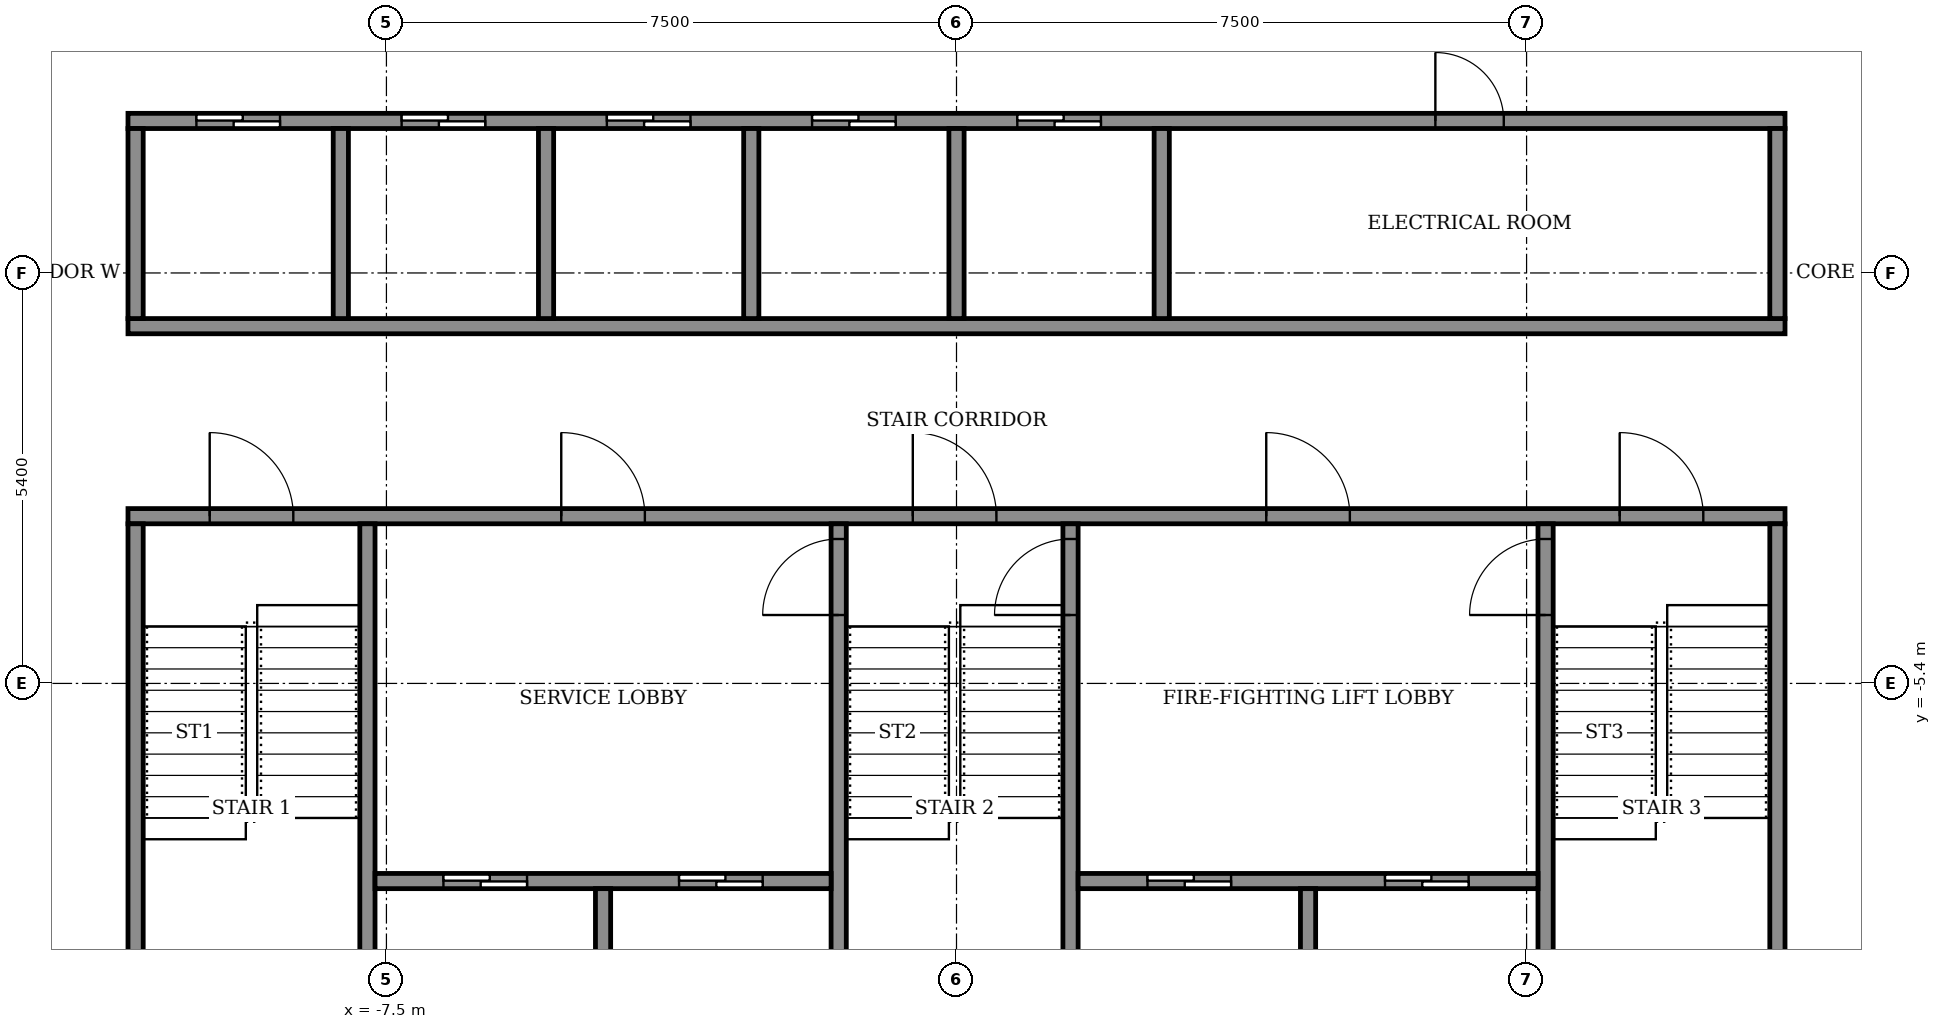
"""IFC4 building model, lengths in metres.
Left out: names, types, materials, properties, quantities, classifications, styles, units other than length and angle.
Written with IfcOpenShell. Run it as: python <this file> out.ifc"""

import sys

from ifc_helpers import new_model, si_unit, direction, frame, frame_2d, origin, place, context, subcontext, project, spatial, rectangle, extrude, element, fill, save


model = new_model("IFC4")
c1 = context("Model", 3, precision=1e-05, world=origin(), true_north=direction((0.0, 1.0)))
c2 = subcontext(c1, "Body", "Model", "MODEL_VIEW")
j1 = project(units=[si_unit("LENGTHUNIT", "METRE"), si_unit("PLANEANGLEUNIT", "RADIAN")], contexts=[c1])
p1 = place(None, origin())
s1 = spatial("IfcSite", under=j1, at=p1, CompositionType="ELEMENT")
p2 = place(p1, origin())
s2 = spatial("IfcBuilding", under=s1, at=p2, CompositionType="ELEMENT")
p3 = place(p2, frame((0.0, 0.0, 109.1)))
s3 = spatial("IfcBuildingStorey", under=s2, at=p3, CompositionType="ELEMENT", Elevation=109.1)
p4 = place(p3, frame((-10.9, -3.2, 0.0), z_axis=(0.0, 0.0, 1.0), x_axis=(1.0, 0.0, 0.0)))
e1 = element("IfcWall", 1, at=p4, inside=s3, PredefinedType="SHEAR", context=c2, shape_type="SweptSolid", body=[
    extrude(rectangle(XDim=21.8, YDim=0.2, at=frame_2d((10.9, 0.0))), origin(), (0.0, 0.0, 1.0), 3.05),
])
p5 = place(p4, frame((1.075, 0.0, 0.0)))
e2 = element("IfcOpeningElement", 2, at=p5, cuts=e1, PredefinedType="OPENING", context=c2, shape_type="SweptSolid", body=[
    extrude(rectangle(XDim=1.1, YDim=2.1, at=frame_2d((0.55, 1.05))), frame((0.0, 0.11, 0.0), z_axis=(0.0, -1.0, 0.0), x_axis=(1.0, 0.0, 0.0)), (0.0, 0.0, 1.0), 0.22),
])
p6 = place(p4, frame((10.325, 0.0, 0.0)))
e3 = element("IfcOpeningElement", 3, at=p6, cuts=e1, PredefinedType="OPENING", context=c2, shape_type="SweptSolid", body=[
    extrude(rectangle(XDim=1.1, YDim=2.1, at=frame_2d((0.55, 1.05))), frame((0.0, 0.11, 0.0), z_axis=(0.0, -1.0, 0.0), x_axis=(1.0, 0.0, 0.0)), (0.0, 0.0, 1.0), 0.22),
])
p7 = place(p4, frame((19.625, 0.0, 0.0)))
e4 = element("IfcOpeningElement", 4, at=p7, cuts=e1, PredefinedType="OPENING", context=c2, shape_type="SweptSolid", body=[
    extrude(rectangle(XDim=1.1, YDim=2.1, at=frame_2d((0.55, 1.05))), frame((0.0, 0.11, 0.0), z_axis=(0.0, -1.0, 0.0), x_axis=(1.0, 0.0, 0.0)), (0.0, 0.0, 1.0), 0.22),
])
p8 = place(p4, frame((5.7, 0.0, 0.0)))
e5 = element("IfcOpeningElement", 5, at=p8, cuts=e1, PredefinedType="OPENING", context=c2, shape_type="SweptSolid", body=[
    extrude(rectangle(XDim=1.1, YDim=2.1, at=frame_2d((0.55, 1.05))), frame((0.0, 0.11, 0.0), z_axis=(0.0, -1.0, 0.0), x_axis=(1.0, 0.0, 0.0)), (0.0, 0.0, 1.0), 0.22),
])
p9 = place(p4, frame((14.975, 0.0, 0.0)))
e6 = element("IfcOpeningElement", 6, at=p9, cuts=e1, PredefinedType="OPENING", context=c2, shape_type="SweptSolid", body=[
    extrude(rectangle(XDim=1.1, YDim=2.1, at=frame_2d((0.55, 1.05))), frame((0.0, 0.11, 0.0), z_axis=(0.0, -1.0, 0.0), x_axis=(1.0, 0.0, 0.0)), (0.0, 0.0, 1.0), 0.22),
])
p10 = place(p3, frame((-10.9, -0.7, 0.0), z_axis=(0.0, 0.0, 1.0), x_axis=(1.0, 0.0, 0.0)))
e7 = element("IfcWall", 7, at=p10, inside=s3, PredefinedType="SHEAR", context=c2, shape_type="SweptSolid", body=[
    extrude(rectangle(XDim=21.8, YDim=0.2, at=frame_2d((10.9, 0.0))), origin(), (0.0, 0.0, 1.0), 3.05),
])
p11 = place(p3, frame((-10.9, 2.0, 0.0), z_axis=(0.0, 0.0, 1.0), x_axis=(1.0, 0.0, 0.0)))
e8 = element("IfcWall", 8, at=p11, inside=s3, PredefinedType="SHEAR", context=c2, shape_type="SweptSolid", body=[
    extrude(rectangle(XDim=21.8, YDim=0.2, at=frame_2d((10.9, 0.0))), origin(), (0.0, 0.0, 1.0), 3.05),
])
p12 = place(p11, frame((0.9, 0.0, 0.0)))
e9 = element("IfcOpeningElement", 9, at=p12, cuts=e8, PredefinedType="OPENING", context=c2, shape_type="SweptSolid", body=[
    extrude(rectangle(XDim=1.1, YDim=2.1, at=frame_2d((0.55, 1.05))), frame((0.0, 0.11, 0.0), z_axis=(0.0, -1.0, 0.0), x_axis=(1.0, 0.0, 0.0)), (0.0, 0.0, 1.0), 0.22),
])
p13 = place(p11, frame((3.6, 0.0, 0.0)))
e10 = element("IfcOpeningElement", 10, at=p13, cuts=e8, PredefinedType="OPENING", context=c2, shape_type="SweptSolid", body=[
    extrude(rectangle(XDim=1.1, YDim=2.1, at=frame_2d((0.55, 1.05))), frame((0.0, 0.11, 0.0), z_axis=(0.0, -1.0, 0.0), x_axis=(1.0, 0.0, 0.0)), (0.0, 0.0, 1.0), 0.22),
])
p14 = place(p11, frame((6.3, 0.0, 0.0)))
e11 = element("IfcOpeningElement", 11, at=p14, cuts=e8, PredefinedType="OPENING", context=c2, shape_type="SweptSolid", body=[
    extrude(rectangle(XDim=1.1, YDim=2.1, at=frame_2d((0.55, 1.05))), frame((0.0, 0.11, 0.0), z_axis=(0.0, -1.0, 0.0), x_axis=(1.0, 0.0, 0.0)), (0.0, 0.0, 1.0), 0.22),
])
p15 = place(p11, frame((9.0, 0.0, 0.0)))
e12 = element("IfcOpeningElement", 12, at=p15, cuts=e8, PredefinedType="OPENING", context=c2, shape_type="SweptSolid", body=[
    extrude(rectangle(XDim=1.1, YDim=2.1, at=frame_2d((0.55, 1.05))), frame((0.0, 0.11, 0.0), z_axis=(0.0, -1.0, 0.0), x_axis=(1.0, 0.0, 0.0)), (0.0, 0.0, 1.0), 0.22),
])
p16 = place(p11, frame((11.7, 0.0, 0.0)))
e13 = element("IfcOpeningElement", 13, at=p16, cuts=e8, PredefinedType="OPENING", context=c2, shape_type="SweptSolid", body=[
    extrude(rectangle(XDim=1.1, YDim=2.1, at=frame_2d((0.55, 1.05))), frame((0.0, 0.11, 0.0), z_axis=(0.0, -1.0, 0.0), x_axis=(1.0, 0.0, 0.0)), (0.0, 0.0, 1.0), 0.22),
])
p17 = place(p11, frame((17.2, 0.0, 0.0)))
e14 = element("IfcOpeningElement", 14, at=p17, cuts=e8, PredefinedType="OPENING", context=c2, shape_type="SweptSolid", body=[
    extrude(rectangle(XDim=0.9, YDim=2.1, at=frame_2d((0.45, 1.05))), frame((0.0, 0.11, 0.0), z_axis=(0.0, -1.0, 0.0), x_axis=(1.0, 0.0, 0.0)), (0.0, 0.0, 1.0), 0.22),
])
for number, where, z_axis, x_axis in (
    (15, (-10.8, -10.8, 0.0), (0.0, 0.0, 1.0), (0.0, 1.0, 0.0)),
    (16, (-7.75, -10.8, 0.0), (0.0, 0.0, 1.0), (0.0, 1.0, 0.0)),
):
    element("IfcWall", number, at=place(p3, frame(where, z_axis=z_axis, x_axis=x_axis)), inside=s3, PredefinedType="SHEAR", context=c2, shape_type="SweptSolid", body=[
        extrude(rectangle(XDim=7.5, YDim=0.2, at=frame_2d((3.75, 0.0))), origin(), (0.0, 0.0, 1.0), 3.05),
    ])
p18 = place(p3, frame((-1.55, -10.8, 0.0), z_axis=(0.0, 0.0, 1.0), x_axis=(0.0, 1.0, 0.0)))
e17 = element("IfcWall", 17, at=p18, inside=s3, PredefinedType="SHEAR", context=c2, shape_type="SweptSolid", body=[
    extrude(rectangle(XDim=7.5, YDim=0.2, at=frame_2d((3.75, 0.0))), origin(), (0.0, 0.0, 1.0), 3.05),
])
p19 = place(p18, frame((6.3, 0.0, 0.0)))
e18 = element("IfcOpeningElement", 18, at=p19, cuts=e17, PredefinedType="OPENING", context=c2, shape_type="SweptSolid", body=[
    extrude(rectangle(XDim=1.0, YDim=2.1, at=frame_2d((0.5, 1.05))), frame((0.0, 0.11, 0.0), z_axis=(0.0, -1.0, 0.0), x_axis=(1.0, 0.0, 0.0)), (0.0, 0.0, 1.0), 0.22),
])
p20 = place(p3, frame((1.5, -10.8, 0.0), z_axis=(0.0, 0.0, 1.0), x_axis=(0.0, 1.0, 0.0)))
e19 = element("IfcWall", 19, at=p20, inside=s3, PredefinedType="SHEAR", context=c2, shape_type="SweptSolid", body=[
    extrude(rectangle(XDim=7.5, YDim=0.2, at=frame_2d((3.75, 0.0))), origin(), (0.0, 0.0, 1.0), 3.05),
])
p21 = place(p20, frame((6.3, 0.0, 0.0)))
e20 = element("IfcOpeningElement", 20, at=p21, cuts=e19, PredefinedType="OPENING", context=c2, shape_type="SweptSolid", body=[
    extrude(rectangle(XDim=1.0, YDim=2.1, at=frame_2d((0.5, 1.05))), frame((0.0, 0.11, 0.0), z_axis=(0.0, -1.0, 0.0), x_axis=(1.0, 0.0, 0.0)), (0.0, 0.0, 1.0), 0.22),
])
p22 = place(p3, frame((7.75, -10.8, 0.0), z_axis=(0.0, 0.0, 1.0), x_axis=(0.0, 1.0, 0.0)))
e21 = element("IfcWall", 21, at=p22, inside=s3, PredefinedType="SHEAR", context=c2, shape_type="SweptSolid", body=[
    extrude(rectangle(XDim=7.5, YDim=0.2, at=frame_2d((3.75, 0.0))), origin(), (0.0, 0.0, 1.0), 3.05),
])
p23 = place(p22, frame((6.3, 0.0, 0.0)))
e22 = element("IfcOpeningElement", 22, at=p23, cuts=e21, PredefinedType="OPENING", context=c2, shape_type="SweptSolid", body=[
    extrude(rectangle(XDim=1.0, YDim=2.1, at=frame_2d((0.5, 1.05))), frame((0.0, 0.11, 0.0), z_axis=(0.0, -1.0, 0.0), x_axis=(1.0, 0.0, 0.0)), (0.0, 0.0, 1.0), 0.22),
])
p24 = place(p3, frame((10.8, -10.8, 0.0), z_axis=(0.0, 0.0, 1.0), x_axis=(0.0, 1.0, 0.0)))
e23 = element("IfcWall", 23, at=p24, inside=s3, PredefinedType="SHEAR", context=c2, shape_type="SweptSolid", body=[
    extrude(rectangle(XDim=7.5, YDim=0.2, at=frame_2d((3.75, 0.0))), origin(), (0.0, 0.0, 1.0), 3.05),
])
p25 = place(p3, frame((-7.65, -8.0, 0.0), z_axis=(0.0, 0.0, 1.0), x_axis=(1.0, 0.0, 0.0)))
e24 = element("IfcWall", 24, at=p25, inside=s3, PredefinedType="SHEAR", context=c2, shape_type="SweptSolid", body=[
    extrude(rectangle(XDim=6.0, YDim=0.2, at=frame_2d((3.0, 0.0))), origin(), (0.0, 0.0, 1.0), 3.05),
])
p26 = place(p25, frame((0.9, 0.0, 0.0)))
e25 = element("IfcOpeningElement", 25, at=p26, cuts=e24, PredefinedType="OPENING", context=c2, shape_type="SweptSolid", body=[
    extrude(rectangle(XDim=1.1, YDim=2.1, at=frame_2d((0.55, 1.05))), frame((0.0, 0.11, 0.0), z_axis=(0.0, -1.0, 0.0), x_axis=(1.0, 0.0, 0.0)), (0.0, 0.0, 1.0), 0.22),
])
p27 = place(p25, frame((4.0, 0.0, 0.0)))
e26 = element("IfcOpeningElement", 26, at=p27, cuts=e24, PredefinedType="OPENING", context=c2, shape_type="SweptSolid", body=[
    extrude(rectangle(XDim=1.1, YDim=2.1, at=frame_2d((0.55, 1.05))), frame((0.0, 0.11, 0.0), z_axis=(0.0, -1.0, 0.0), x_axis=(1.0, 0.0, 0.0)), (0.0, 0.0, 1.0), 0.22),
])
p28 = place(p3, frame((-4.65, -10.8, 0.0), z_axis=(0.0, 0.0, 1.0), x_axis=(0.0, 1.0, 0.0)))
e27 = element("IfcWall", 27, at=p28, inside=s3, PredefinedType="SHEAR", context=c2, shape_type="SweptSolid", body=[
    extrude(rectangle(XDim=2.7, YDim=0.2, at=frame_2d((1.35, 0.0))), origin(), (0.0, 0.0, 1.0), 3.05),
])
p29 = place(p3, frame((1.6, -8.0, 0.0), z_axis=(0.0, 0.0, 1.0), x_axis=(1.0, 0.0, 0.0)))
e28 = element("IfcWall", 28, at=p29, inside=s3, PredefinedType="SHEAR", context=c2, shape_type="SweptSolid", body=[
    extrude(rectangle(XDim=6.05, YDim=0.2, at=frame_2d((3.025, 0.0))), origin(), (0.0, 0.0, 1.0), 3.05),
])
p30 = place(p29, frame((0.913, 0.0, 0.0)))
e29 = element("IfcOpeningElement", 29, at=p30, cuts=e28, PredefinedType="OPENING", context=c2, shape_type="SweptSolid", body=[
    extrude(rectangle(XDim=1.1, YDim=2.1, at=frame_2d((0.55, 1.05))), frame((0.0, 0.11, 0.0), z_axis=(0.0, -1.0, 0.0), x_axis=(1.0, 0.0, 0.0)), (0.0, 0.0, 1.0), 0.22),
])
p31 = place(p29, frame((4.038, 0.0, 0.0)))
e30 = element("IfcOpeningElement", 30, at=p31, cuts=e28, PredefinedType="OPENING", context=c2, shape_type="SweptSolid", body=[
    extrude(rectangle(XDim=1.1, YDim=2.1, at=frame_2d((0.55, 1.05))), frame((0.0, 0.11, 0.0), z_axis=(0.0, -1.0, 0.0), x_axis=(1.0, 0.0, 0.0)), (0.0, 0.0, 1.0), 0.22),
])
p32 = place(p3, frame((4.625, -10.8, 0.0), z_axis=(0.0, 0.0, 1.0), x_axis=(0.0, 1.0, 0.0)))
e31 = element("IfcWall", 31, at=p32, inside=s3, PredefinedType="SHEAR", context=c2, shape_type="SweptSolid", body=[
    extrude(rectangle(XDim=2.7, YDim=0.2, at=frame_2d((1.35, 0.0))), origin(), (0.0, 0.0, 1.0), 3.05),
])
for number, where, z_axis, x_axis in (
    (32, (-10.8, -0.6, 0.0), (0.0, 0.0, 1.0), (0.0, 1.0, 0.0)),
    (33, (-8.1, -0.6, 0.0), (0.0, 0.0, 1.0), (0.0, 1.0, 0.0)),
    (34, (-5.4, -0.6, 0.0), (0.0, 0.0, 1.0), (0.0, 1.0, 0.0)),
    (35, (-2.7, -0.6, 0.0), (0.0, 0.0, 1.0), (0.0, 1.0, 0.0)),
    (36, (0.0, -0.6, 0.0), (0.0, 0.0, 1.0), (0.0, 1.0, 0.0)),
    (37, (2.7, -0.6, 0.0), (0.0, 0.0, 1.0), (0.0, 1.0, 0.0)),
):
    element("IfcWall", number, at=place(p3, frame(where, z_axis=z_axis, x_axis=x_axis)), inside=s3, PredefinedType="SHEAR", context=c2, shape_type="SweptSolid", body=[
        extrude(rectangle(XDim=2.5, YDim=0.2, at=frame_2d((1.25, 0.0))), origin(), (0.0, 0.0, 1.0), 3.05),
    ])
p33 = place(p3, frame((10.8, -0.6, 0.0), z_axis=(0.0, 0.0, 1.0), x_axis=(0.0, 1.0, 0.0)))
e38 = element("IfcWall", 38, at=p33, inside=s3, PredefinedType="STANDARD", context=c2, shape_type="SweptSolid", body=[
    extrude(rectangle(XDim=2.5, YDim=0.2, at=frame_2d((1.25, 0.0))), origin(), (0.0, 0.0, 1.0), 3.05),
])
p34 = place(p12, origin())
e39 = element("IfcDoor", 39, at=p34, inside=s3, OperationType="SLIDING_TO_LEFT", PredefinedType="DOOR", context=c2, shape_type="SweptSolid", body=[
    extrude(rectangle(XDim=1.1, YDim=2.1, at=frame_2d((0.55, 1.05))), frame((0.0, 0.025, 0.0), z_axis=(0.0, -1.0, 0.0), x_axis=(1.0, 0.0, 0.0)), (0.0, 0.0, 1.0), 0.05),
])
fill(e9, e39)
p35 = place(p13, origin())
e40 = element("IfcDoor", 40, at=p35, inside=s3, OperationType="SLIDING_TO_LEFT", PredefinedType="DOOR", context=c2, shape_type="SweptSolid", body=[
    extrude(rectangle(XDim=1.1, YDim=2.1, at=frame_2d((0.55, 1.05))), frame((0.0, 0.025, 0.0), z_axis=(0.0, -1.0, 0.0), x_axis=(1.0, 0.0, 0.0)), (0.0, 0.0, 1.0), 0.05),
])
fill(e10, e40)
p36 = place(p14, origin())
e41 = element("IfcDoor", 41, at=p36, inside=s3, OperationType="SLIDING_TO_LEFT", PredefinedType="DOOR", context=c2, shape_type="SweptSolid", body=[
    extrude(rectangle(XDim=1.1, YDim=2.1, at=frame_2d((0.55, 1.05))), frame((0.0, 0.025, 0.0), z_axis=(0.0, -1.0, 0.0), x_axis=(1.0, 0.0, 0.0)), (0.0, 0.0, 1.0), 0.05),
])
fill(e11, e41)
p37 = place(p15, origin())
e42 = element("IfcDoor", 42, at=p37, inside=s3, OperationType="SLIDING_TO_LEFT", PredefinedType="DOOR", context=c2, shape_type="SweptSolid", body=[
    extrude(rectangle(XDim=1.1, YDim=2.1, at=frame_2d((0.55, 1.05))), frame((0.0, 0.025, 0.0), z_axis=(0.0, -1.0, 0.0), x_axis=(1.0, 0.0, 0.0)), (0.0, 0.0, 1.0), 0.05),
])
fill(e12, e42)
p38 = place(p16, origin())
e43 = element("IfcDoor", 43, at=p38, inside=s3, OperationType="SLIDING_TO_LEFT", PredefinedType="DOOR", context=c2, shape_type="SweptSolid", body=[
    extrude(rectangle(XDim=1.1, YDim=2.1, at=frame_2d((0.55, 1.05))), frame((0.0, 0.025, 0.0), z_axis=(0.0, -1.0, 0.0), x_axis=(1.0, 0.0, 0.0)), (0.0, 0.0, 1.0), 0.05),
])
fill(e13, e43)
p39 = place(p17, origin())
e44 = element("IfcDoor", 44, at=p39, inside=s3, OperationType="SINGLE_SWING_LEFT", PredefinedType="DOOR", context=c2, shape_type="SweptSolid", body=[
    extrude(rectangle(XDim=0.9, YDim=2.1, at=frame_2d((0.45, 1.05))), frame((0.0, 0.025, 0.0), z_axis=(0.0, -1.0, 0.0), x_axis=(1.0, 0.0, 0.0)), (0.0, 0.0, 1.0), 0.05),
])
fill(e14, e44)
p40 = place(p30, origin())
e45 = element("IfcDoor", 45, at=p40, inside=s3, OperationType="SLIDING_TO_LEFT", PredefinedType="DOOR", context=c2, shape_type="SweptSolid", body=[
    extrude(rectangle(XDim=1.1, YDim=2.1, at=frame_2d((0.55, 1.05))), frame((0.0, 0.025, 0.0), z_axis=(0.0, -1.0, 0.0), x_axis=(1.0, 0.0, 0.0)), (0.0, 0.0, 1.0), 0.05),
])
fill(e29, e45)
p41 = place(p26, origin())
e46 = element("IfcDoor", 46, at=p41, inside=s3, OperationType="SLIDING_TO_LEFT", PredefinedType="DOOR", context=c2, shape_type="SweptSolid", body=[
    extrude(rectangle(XDim=1.1, YDim=2.1, at=frame_2d((0.55, 1.05))), frame((0.0, 0.025, 0.0), z_axis=(0.0, -1.0, 0.0), x_axis=(1.0, 0.0, 0.0)), (0.0, 0.0, 1.0), 0.05),
])
fill(e25, e46)
p42 = place(p31, origin())
e47 = element("IfcDoor", 47, at=p42, inside=s3, OperationType="SLIDING_TO_LEFT", PredefinedType="DOOR", context=c2, shape_type="SweptSolid", body=[
    extrude(rectangle(XDim=1.1, YDim=2.1, at=frame_2d((0.55, 1.05))), frame((0.0, 0.025, 0.0), z_axis=(0.0, -1.0, 0.0), x_axis=(1.0, 0.0, 0.0)), (0.0, 0.0, 1.0), 0.05),
])
fill(e30, e47)
p43 = place(p27, origin())
e48 = element("IfcDoor", 48, at=p43, inside=s3, OperationType="SLIDING_TO_LEFT", PredefinedType="DOOR", context=c2, shape_type="SweptSolid", body=[
    extrude(rectangle(XDim=1.1, YDim=2.1, at=frame_2d((0.55, 1.05))), frame((0.0, 0.025, 0.0), z_axis=(0.0, -1.0, 0.0), x_axis=(1.0, 0.0, 0.0)), (0.0, 0.0, 1.0), 0.05),
])
fill(e26, e48)
p44 = place(p5, origin())
e49 = element("IfcDoor", 49, at=p44, inside=s3, OperationType="SINGLE_SWING_RIGHT", PredefinedType="DOOR", context=c2, shape_type="SweptSolid", body=[
    extrude(rectangle(XDim=1.1, YDim=2.1, at=frame_2d((0.55, 1.05))), frame((0.0, 0.025, 0.0), z_axis=(0.0, -1.0, 0.0), x_axis=(1.0, 0.0, 0.0)), (0.0, 0.0, 1.0), 0.05),
])
fill(e2, e49)
p45 = place(p6, origin())
e50 = element("IfcDoor", 50, at=p45, inside=s3, OperationType="SINGLE_SWING_RIGHT", PredefinedType="DOOR", context=c2, shape_type="SweptSolid", body=[
    extrude(rectangle(XDim=1.1, YDim=2.1, at=frame_2d((0.55, 1.05))), frame((0.0, 0.025, 0.0), z_axis=(0.0, -1.0, 0.0), x_axis=(1.0, 0.0, 0.0)), (0.0, 0.0, 1.0), 0.05),
])
fill(e3, e50)
p46 = place(p7, origin())
e51 = element("IfcDoor", 51, at=p46, inside=s3, OperationType="SINGLE_SWING_RIGHT", PredefinedType="DOOR", context=c2, shape_type="SweptSolid", body=[
    extrude(rectangle(XDim=1.1, YDim=2.1, at=frame_2d((0.55, 1.05))), frame((0.0, 0.025, 0.0), z_axis=(0.0, -1.0, 0.0), x_axis=(1.0, 0.0, 0.0)), (0.0, 0.0, 1.0), 0.05),
])
fill(e4, e51)
p47 = place(p8, origin())
e52 = element("IfcDoor", 52, at=p47, inside=s3, OperationType="SINGLE_SWING_LEFT", PredefinedType="DOOR", context=c2, shape_type="SweptSolid", body=[
    extrude(rectangle(XDim=1.1, YDim=2.1, at=frame_2d((0.55, 1.05))), frame((0.0, 0.025, 0.0), z_axis=(0.0, -1.0, 0.0), x_axis=(1.0, 0.0, 0.0)), (0.0, 0.0, 1.0), 0.05),
])
fill(e5, e52)
p48 = place(p9, origin())
e53 = element("IfcDoor", 53, at=p48, inside=s3, OperationType="SINGLE_SWING_LEFT", PredefinedType="DOOR", context=c2, shape_type="SweptSolid", body=[
    extrude(rectangle(XDim=1.1, YDim=2.1, at=frame_2d((0.55, 1.05))), frame((0.0, 0.025, 0.0), z_axis=(0.0, -1.0, 0.0), x_axis=(1.0, 0.0, 0.0)), (0.0, 0.0, 1.0), 0.05),
])
fill(e6, e53)
p49 = place(p19, origin())
e54 = element("IfcDoor", 54, at=p49, inside=s3, OperationType="SINGLE_SWING_RIGHT", PredefinedType="DOOR", context=c2, shape_type="SweptSolid", body=[
    extrude(rectangle(XDim=1.0, YDim=2.1, at=frame_2d((0.5, 1.05))), frame((0.0, 0.025, 0.0), z_axis=(0.0, -1.0, 0.0), x_axis=(1.0, 0.0, 0.0)), (0.0, 0.0, 1.0), 0.05),
])
fill(e18, e54)
p50 = place(p21, origin())
e55 = element("IfcDoor", 55, at=p50, inside=s3, OperationType="SINGLE_SWING_RIGHT", PredefinedType="DOOR", context=c2, shape_type="SweptSolid", body=[
    extrude(rectangle(XDim=1.0, YDim=2.1, at=frame_2d((0.5, 1.05))), frame((0.0, 0.025, 0.0), z_axis=(0.0, -1.0, 0.0), x_axis=(1.0, 0.0, 0.0)), (0.0, 0.0, 1.0), 0.05),
])
fill(e20, e55)
p51 = place(p23, origin())
e56 = element("IfcDoor", 56, at=p51, inside=s3, OperationType="SINGLE_SWING_RIGHT", PredefinedType="DOOR", context=c2, shape_type="SweptSolid", body=[
    extrude(rectangle(XDim=1.0, YDim=2.1, at=frame_2d((0.5, 1.05))), frame((0.0, 0.025, 0.0), z_axis=(0.0, -1.0, 0.0), x_axis=(1.0, 0.0, 0.0)), (0.0, 0.0, 1.0), 0.05),
])
fill(e22, e56)
save(model, sys.argv[1])
